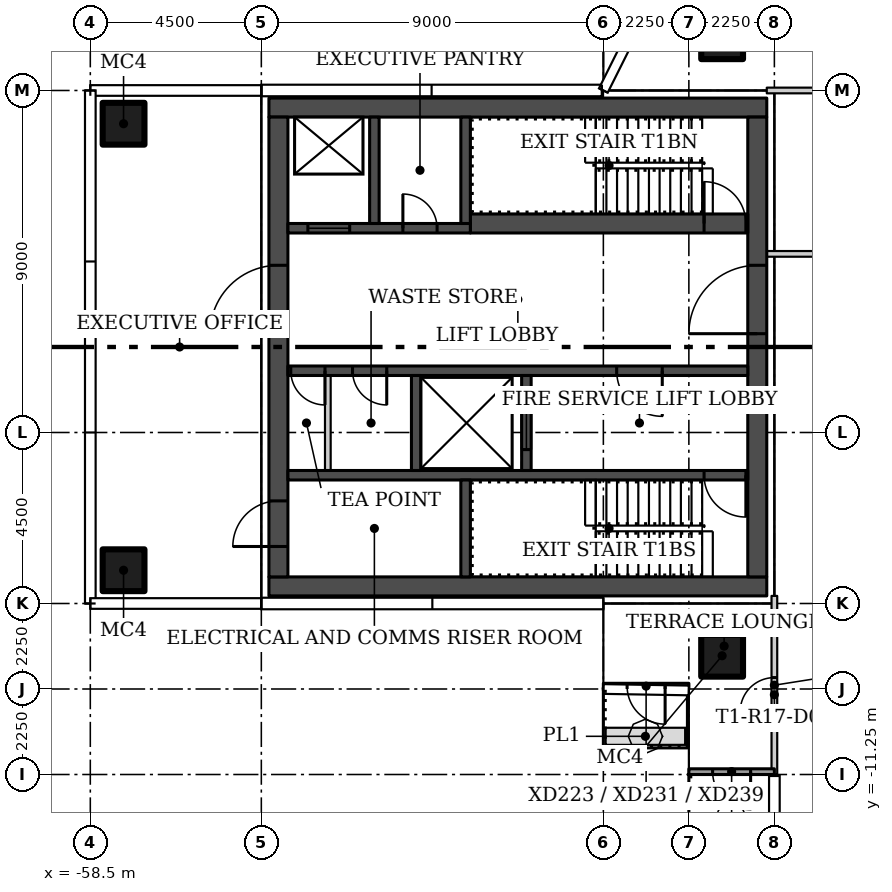
"""IFC4 building model, lengths in metres.
Left out: names, types, materials, properties, quantities, classifications, styles, units other than length and angle.
Written with IfcOpenShell. Run it as: python <this file> out.ifc"""

import sys

from ifc_helpers import new_model, si_unit, direction, frame, frame_2d, origin, origin_2d, place, context, subcontext, project, spatial, rectangle, hollow_rectangle, extrude, element, fill, save


model = new_model("IFC4")
c1 = context("Model", 3, precision=1e-05, world=origin(), true_north=direction((0.0, 1.0)))
c2 = subcontext(c1, "Body", "Model", "MODEL_VIEW")
j1 = project(units=[si_unit("LENGTHUNIT", "METRE"), si_unit("PLANEANGLEUNIT", "RADIAN")], contexts=[c1])
p1 = place(None, origin())
s1 = spatial("IfcSite", under=j1, at=p1, CompositionType="ELEMENT")
p2 = place(p1, origin())
s2 = spatial("IfcBuilding", under=s1, at=p2, CompositionType="ELEMENT")
p3 = place(p2, frame((0.0, 0.0, 150.6)))
s3 = spatial("IfcBuildingStorey", under=s2, at=p3, CompositionType="ELEMENT", Elevation=150.6)
for number, where in (
    (1, (-41.875, 8.125, 0.0)),
    (2, (-41.875, -8.125, 0.0)),
    (3, (-57.625, -5.875, 0.0)),
    (4, (-57.625, 5.875, 0.0)),
):
    element("IfcColumn", number, at=place(p3, frame(where)), inside=s3, PredefinedType="COLUMN", context=c2, shape_type="SweptSolid", body=[
        extrude(hollow_rectangle(XDim=1.1, YDim=1.1, WallThickness=0.04, at=origin_2d()), origin(), (0.0, 0.0, 1.0), 3.55),
    ])
p4 = place(p3, frame((-40.7, 2.45, 0.0)))
e5 = element("IfcWall", 5, at=p4, inside=s3, PredefinedType="PARTITIONING", context=c2, shape_type="SweptSolid", body=[
    extrude(rectangle(XDim=5.525, YDim=0.15, at=frame_2d((2.762, 0.0))), origin(), (0.0, 0.0, 1.0), 3.55),
])
p5 = place(p4, frame((2.375, 0.0, 0.0)))
e6 = element("IfcOpeningElement", 6, at=p5, cuts=e5, PredefinedType="OPENING", context=c2, shape_type="SweptSolid", body=[
    extrude(rectangle(XDim=0.9, YDim=2.1, at=frame_2d((0.45, 1.05))), frame((0.0, 0.085, 0.0), z_axis=(0.0, -1.0, 0.0), x_axis=(1.0, 0.0, 0.0)), (0.0, 0.0, 1.0), 0.17),
])
p6 = place(p3, frame((-40.5, -11.25, 0.0), z_axis=(0.0, 0.0, 1.0), x_axis=(0.0, 1.0, 0.0)))
e7 = element("IfcWall", 7, at=p6, inside=s3, PredefinedType="PARTITIONING", context=c2, shape_type="SweptSolid", body=[
    extrude(rectangle(XDim=4.7, YDim=0.15, at=frame_2d((2.35, 0.0))), origin(), (0.0, 0.0, 1.0), 3.55),
])
p7 = place(p6, frame((1.65, 0.0, 0.0)))
e8 = element("IfcOpeningElement", 8, at=p7, cuts=e7, PredefinedType="OPENING", context=c2, shape_type="SweptSolid", body=[
    extrude(rectangle(XDim=0.9, YDim=2.1, at=frame_2d((0.45, 1.05))), frame((0.0, 0.085, 0.0), z_axis=(0.0, -1.0, 0.0), x_axis=(1.0, 0.0, 0.0)), (0.0, 0.0, 1.0), 0.17),
])
p8 = place(p3, frame((-40.7, 6.75, 0.0)))
e9 = element("IfcWall", 9, at=p8, inside=s3, PredefinedType="PARTITIONING", context=c2, shape_type="SweptSolid", body=[
    extrude(rectangle(XDim=10.775, YDim=0.15, at=frame_2d((5.387, 0.0))), origin(), (0.0, 0.0, 1.0), 3.55),
])
p9 = place(p3, frame((-42.75, -8.925, 0.0), z_axis=(0.0, 0.0, 1.0), x_axis=(-1.0, 0.0, 0.0)))
e10 = element("IfcWall", 10, at=p9, inside=s3, PredefinedType="SOLIDWALL", context=c2, shape_type="SweptSolid", body=[
    extrude(rectangle(XDim=2.25, YDim=0.15, at=frame_2d((1.125, 0.0))), origin(), (0.0, 0.0, 1.0), 3.45),
])
p10 = place(p9, frame((0.625, 0.0, 0.0)))
e11 = element("IfcOpeningElement", 11, at=p10, cuts=e10, PredefinedType="OPENING", context=c2, shape_type="SweptSolid", body=[
    extrude(rectangle(XDim=1.0, YDim=2.4, at=frame_2d((0.5, 1.2))), frame((0.0, 0.085, 0.0), z_axis=(0.0, -1.0, 0.0), x_axis=(1.0, 0.0, 0.0)), (0.0, 0.0, 1.0), 0.17),
])
p11 = place(p3, frame((-40.5, -11.175, 0.0), z_axis=(0.0, 0.0, 1.0), x_axis=(-1.0, 0.0, 0.0)))
e12 = element("IfcWall", 12, at=p11, inside=s3, PredefinedType="SOLIDWALL", context=c2, shape_type="SweptSolid", body=[
    extrude(rectangle(XDim=2.25, YDim=0.15, at=frame_2d((1.125, 0.0))), origin(), (0.0, 0.0, 1.0), 3.45),
])
p12 = place(p11, frame((0.625, 0.0, 0.0)))
e13 = element("IfcOpeningElement", 13, at=p12, cuts=e12, PredefinedType="OPENING", context=c2, shape_type="SweptSolid", body=[
    extrude(rectangle(XDim=1.0, YDim=2.4, at=frame_2d((0.5, 1.2))), frame((0.0, 0.085, 0.0), z_axis=(0.0, -1.0, 0.0), x_axis=(1.0, 0.0, 0.0)), (0.0, 0.0, 1.0), 0.17),
])
for number, where, z_axis, x_axis in (
    (14, (-40.7, -6.3, 0.0), (0.0, 0.0, 1.0), (-1.0, 0.0, 0.0)),
    (15, (-40.7, 6.3, 0.0), (0.0, 0.0, 1.0), (-1.0, 0.0, 0.0)),
):
    element("IfcWall", number, at=place(p3, frame(where, z_axis=z_axis, x_axis=x_axis)), inside=s3, PredefinedType="SHEAR", context=c2, shape_type="SweptSolid", body=[
        extrude(rectangle(XDim=13.1, YDim=0.5, at=frame_2d((6.55, 0.0))), origin(), (0.0, 0.0, 1.0), 3.55),
    ])
p13 = place(p3, frame((-40.95, -6.05, 0.0), z_axis=(0.0, 0.0, 1.0), x_axis=(0.0, 1.0, 0.0)))
e16 = element("IfcWall", 16, at=p13, inside=s3, PredefinedType="SHEAR", context=c2, shape_type="SweptSolid", body=[
    extrude(rectangle(XDim=12.1, YDim=0.5, at=frame_2d((6.05, 0.0))), origin(), (0.0, 0.0, 1.0), 3.55),
])
p14 = place(p13, frame((6.4, 0.0, 0.0)))
e17 = element("IfcOpeningElement", 17, at=p14, cuts=e16, PredefinedType="OPENING", context=c2, shape_type="SweptSolid", body=[
    extrude(rectangle(XDim=1.8, YDim=2.4, at=frame_2d((0.9, 1.2))), frame((0.0, 0.26, 0.0), z_axis=(0.0, -1.0, 0.0), x_axis=(1.0, 0.0, 0.0)), (0.0, 0.0, 1.0), 0.52),
])
p15 = place(p3, frame((-53.55, -6.05, 0.0), z_axis=(0.0, 0.0, 1.0), x_axis=(0.0, 1.0, 0.0)))
e18 = element("IfcWall", 18, at=p15, inside=s3, PredefinedType="SHEAR", context=c2, shape_type="SweptSolid", body=[
    extrude(rectangle(XDim=12.1, YDim=0.5, at=frame_2d((6.05, 0.0))), origin(), (0.0, 0.0, 1.0), 3.55),
])
p16 = place(p15, frame((0.8, 0.0, 0.0)))
e19 = element("IfcOpeningElement", 19, at=p16, cuts=e18, PredefinedType="OPENING", context=c2, shape_type="SweptSolid", body=[
    extrude(rectangle(XDim=1.2, YDim=2.1, at=frame_2d((0.6, 1.05))), frame((0.0, 0.26, 0.0), z_axis=(0.0, -1.0, 0.0), x_axis=(1.0, 0.0, 0.0)), (0.0, 0.0, 1.0), 0.52),
])
p17 = place(p15, frame((6.4, 0.0, 0.0)))
e20 = element("IfcOpeningElement", 20, at=p17, cuts=e18, PredefinedType="OPENING", context=c2, shape_type="SweptSolid", body=[
    extrude(rectangle(XDim=1.8, YDim=2.4, at=frame_2d((0.9, 1.2))), frame((0.0, 0.26, 0.0), z_axis=(0.0, -1.0, 0.0), x_axis=(1.0, 0.0, 0.0)), (0.0, 0.0, 1.0), 0.52),
])
p18 = place(p3, frame((-41.2, -3.375, 0.0), z_axis=(0.0, 0.0, 1.0), x_axis=(-1.0, 0.0, 0.0)))
e21 = element("IfcWall", 21, at=p18, inside=s3, PredefinedType="SHEAR", context=c2, shape_type="SweptSolid", body=[
    extrude(rectangle(XDim=12.1, YDim=0.25, at=frame_2d((6.05, 0.0))), origin(), (0.0, 0.0, 1.0), 3.55),
])
p19 = place(p18, frame((0.05, 0.0, 0.0)))
e22 = element("IfcOpeningElement", 22, at=p19, cuts=e21, PredefinedType="OPENING", context=c2, shape_type="SweptSolid", body=[
    extrude(rectangle(XDim=1.1, YDim=2.1, at=frame_2d((0.55, 1.05))), frame((0.0, 0.135, 0.0), z_axis=(0.0, -1.0, 0.0), x_axis=(1.0, 0.0, 0.0)), (0.0, 0.0, 1.0), 0.27),
])
p20 = place(p3, frame((-48.625, -6.05, 0.0), z_axis=(0.0, 0.0, 1.0), x_axis=(0.0, 1.0, 0.0)))
e23 = element("IfcWall", 23, at=p20, inside=s3, PredefinedType="SHEAR", context=c2, shape_type="SweptSolid", body=[
    extrude(rectangle(XDim=2.55, YDim=0.25, at=frame_2d((1.275, 0.0))), origin(), (0.0, 0.0, 1.0), 3.55),
])
p21 = place(p3, frame((-41.2, -0.625, 0.0), z_axis=(0.0, 0.0, 1.0), x_axis=(-1.0, 0.0, 0.0)))
e24 = element("IfcWall", 24, at=p21, inside=s3, PredefinedType="SHEAR", context=c2, shape_type="SweptSolid", body=[
    extrude(rectangle(XDim=12.1, YDim=0.25, at=frame_2d((6.05, 0.0))), origin(), (0.0, 0.0, 1.0), 3.55),
])
p22 = place(p21, frame((2.25, 0.0, 0.0)))
e25 = element("IfcOpeningElement", 25, at=p22, cuts=e24, PredefinedType="OPENING", context=c2, shape_type="SweptSolid", body=[
    extrude(rectangle(XDim=1.2, YDim=2.1, at=frame_2d((0.6, 1.05))), frame((0.0, 0.135, 0.0), z_axis=(0.0, -1.0, 0.0), x_axis=(1.0, 0.0, 0.0)), (0.0, 0.0, 1.0), 0.27),
])
p23 = place(p21, frame((9.5, 0.0, 0.0)))
e26 = element("IfcOpeningElement", 26, at=p23, cuts=e24, PredefinedType="OPENING", context=c2, shape_type="SweptSolid", body=[
    extrude(rectangle(XDim=0.9, YDim=2.1, at=frame_2d((0.45, 1.05))), frame((0.0, 0.135, 0.0), z_axis=(0.0, -1.0, 0.0), x_axis=(1.0, 0.0, 0.0)), (0.0, 0.0, 1.0), 0.27),
])
p24 = place(p21, frame((11.125, 0.0, 0.0)))
e27 = element("IfcOpeningElement", 27, at=p24, cuts=e24, PredefinedType="OPENING", context=c2, shape_type="SweptSolid", body=[
    extrude(rectangle(XDim=0.9, YDim=2.1, at=frame_2d((0.45, 1.05))), frame((0.0, 0.135, 0.0), z_axis=(0.0, -1.0, 0.0), x_axis=(1.0, 0.0, 0.0)), (0.0, 0.0, 1.0), 0.27),
])
p25 = place(p3, frame((-47.025, -3.25, 0.0), z_axis=(0.0, 0.0, 1.0), x_axis=(0.0, 1.0, 0.0)))
e28 = element("IfcWall", 28, at=p25, inside=s3, PredefinedType="SHEAR", context=c2, shape_type="SweptSolid", body=[
    extrude(rectangle(XDim=2.5, YDim=0.25, at=frame_2d((1.25, 0.0))), origin(), (0.0, 0.0, 1.0), 3.55),
])
p26 = place(p25, frame((0.55, 0.0, 0.0)))
e29 = element("IfcOpeningElement", 29, at=p26, cuts=e28, PredefinedType="OPENING", context=c2, shape_type="SweptSolid", body=[
    extrude(rectangle(XDim=1.4, YDim=2.4, at=frame_2d((0.7, 1.2))), frame((0.0, 0.135, 0.0), z_axis=(0.0, -1.0, 0.0), x_axis=(1.0, 0.0, 0.0)), (0.0, 0.0, 1.0), 0.27),
])
p27 = place(p3, frame((-49.925, -3.25, 0.0), z_axis=(0.0, 0.0, 1.0), x_axis=(0.0, 1.0, 0.0)))
e30 = element("IfcWall", 30, at=p27, inside=s3, PredefinedType="SHEAR", context=c2, shape_type="SweptSolid", body=[
    extrude(rectangle(XDim=2.5, YDim=0.25, at=frame_2d((1.25, 0.0))), origin(), (0.0, 0.0, 1.0), 3.55),
])
p28 = place(p3, frame((-52.25, -3.25, 0.0), z_axis=(0.0, 0.0, 1.0), x_axis=(0.0, 1.0, 0.0)))
e31 = element("IfcWall", 31, at=p28, inside=s3, PredefinedType="PARTITIONING", context=c2, shape_type="SweptSolid", body=[
    extrude(rectangle(XDim=2.5, YDim=0.15, at=frame_2d((1.25, 0.0))), origin(), (0.0, 0.0, 1.0), 3.55),
])
p29 = place(p3, frame((-48.5, 3.25, 0.0)))
e32 = element("IfcWall", 32, at=p29, inside=s3, PredefinedType="SHEAR", context=c2, shape_type="SweptSolid", body=[
    extrude(rectangle(XDim=7.3, YDim=0.5, at=frame_2d((3.65, 0.0))), origin(), (0.0, 0.0, 1.0), 3.55),
])
p30 = place(p29, frame((6.15, 0.0, 0.0)))
e33 = element("IfcOpeningElement", 33, at=p30, cuts=e32, PredefinedType="OPENING", context=c2, shape_type="SweptSolid", body=[
    extrude(rectangle(XDim=1.1, YDim=2.1, at=frame_2d((0.55, 1.05))), frame((0.0, 0.26, 0.0), z_axis=(0.0, -1.0, 0.0), x_axis=(1.0, 0.0, 0.0)), (0.0, 0.0, 1.0), 0.52),
])
p31 = place(p3, frame((-53.3, 3.125, 0.0)))
e34 = element("IfcWall", 34, at=p31, inside=s3, PredefinedType="SHEAR", context=c2, shape_type="SweptSolid", body=[
    extrude(rectangle(XDim=4.8, YDim=0.25, at=frame_2d((2.4, 0.0))), origin(), (0.0, 0.0, 1.0), 3.55),
])
p32 = place(p31, frame((0.525, 0.0, 0.0)))
e35 = element("IfcOpeningElement", 35, at=p32, cuts=e34, PredefinedType="OPENING", context=c2, shape_type="SweptSolid", body=[
    extrude(rectangle(XDim=1.1, YDim=2.1, at=frame_2d((0.55, 1.05))), frame((0.0, 0.135, 0.0), z_axis=(0.0, -1.0, 0.0), x_axis=(1.0, 0.0, 0.0)), (0.0, 0.0, 1.0), 0.27),
])
p33 = place(p31, frame((3.025, 0.0, 0.0)))
e36 = element("IfcOpeningElement", 36, at=p33, cuts=e34, PredefinedType="OPENING", context=c2, shape_type="SweptSolid", body=[
    extrude(rectangle(XDim=0.9, YDim=2.1, at=frame_2d((0.45, 1.05))), frame((0.0, 0.135, 0.0), z_axis=(0.0, -1.0, 0.0), x_axis=(1.0, 0.0, 0.0)), (0.0, 0.0, 1.0), 0.27),
])
for number, where, z_axis, x_axis in (
    (37, (-48.625, 3.25, 0.0), (0.0, 0.0, 1.0), (0.0, 1.0, 0.0)),
    (38, (-51.025, 3.25, 0.0), (0.0, 0.0, 1.0), (0.0, 1.0, 0.0)),
):
    element("IfcWall", number, at=place(p3, frame(where, z_axis=z_axis, x_axis=x_axis)), inside=s3, PredefinedType="SHEAR", context=c2, shape_type="SweptSolid", body=[
        extrude(rectangle(XDim=2.8, YDim=0.25, at=frame_2d((1.4, 0.0))), origin(), (0.0, 0.0, 1.0), 3.55),
    ])
p34 = place(p7, origin())
e39 = element("IfcDoor", 39, at=p34, inside=s3, OperationType="SINGLE_SWING_LEFT", PredefinedType="DOOR", context=c2, shape_type="SweptSolid", body=[
    extrude(rectangle(XDim=0.9, YDim=2.1, at=frame_2d((0.45, 1.05))), frame((0.0, 0.025, 0.0), z_axis=(0.0, -1.0, 0.0), x_axis=(1.0, 0.0, 0.0)), (0.0, 0.0, 1.0), 0.05),
])
fill(e8, e39)
p35 = place(p10, origin())
e40 = element("IfcDoor", 40, at=p35, inside=s3, OperationType="SINGLE_SWING_LEFT", PredefinedType="DOOR", context=c2, shape_type="SweptSolid", body=[
    extrude(rectangle(XDim=1.0, YDim=2.4, at=frame_2d((0.5, 1.2))), frame((0.0, 0.025, 0.0), z_axis=(0.0, -1.0, 0.0), x_axis=(1.0, 0.0, 0.0)), (0.0, 0.0, 1.0), 0.05),
])
fill(e11, e40)
p36 = place(p12, origin())
e41 = element("IfcDoor", 41, at=p36, inside=s3, OperationType="SINGLE_SWING_RIGHT", PredefinedType="DOOR", context=c2, shape_type="SweptSolid", body=[
    extrude(rectangle(XDim=1.0, YDim=2.4, at=frame_2d((0.5, 1.2))), frame((0.0, 0.025, 0.0), z_axis=(0.0, -1.0, 0.0), x_axis=(1.0, 0.0, 0.0)), (0.0, 0.0, 1.0), 0.05),
])
fill(e13, e41)
p37 = place(p14, origin())
e42 = element("IfcDoor", 42, at=p37, inside=s3, OperationType="DOUBLE_DOOR_SINGLE_SWING", PredefinedType="DOOR", context=c2, shape_type="SweptSolid", body=[
    extrude(rectangle(XDim=1.8, YDim=2.4, at=frame_2d((0.9, 1.2))), frame((0.0, 0.025, 0.0), z_axis=(0.0, -1.0, 0.0), x_axis=(1.0, 0.0, 0.0)), (0.0, 0.0, 1.0), 0.05),
])
fill(e17, e42)
p38 = place(p16, origin())
e43 = element("IfcDoor", 43, at=p38, inside=s3, OperationType="SINGLE_SWING_LEFT", PredefinedType="DOOR", context=c2, shape_type="SweptSolid", body=[
    extrude(rectangle(XDim=1.2, YDim=2.1, at=frame_2d((0.6, 1.05))), frame((0.0, 0.025, 0.0), z_axis=(0.0, -1.0, 0.0), x_axis=(1.0, 0.0, 0.0)), (0.0, 0.0, 1.0), 0.05),
])
fill(e19, e43)
p39 = place(p17, origin())
e44 = element("IfcDoor", 44, at=p39, inside=s3, OperationType="DOUBLE_DOOR_SINGLE_SWING", PredefinedType="DOOR", context=c2, shape_type="SweptSolid", body=[
    extrude(rectangle(XDim=1.8, YDim=2.4, at=frame_2d((0.9, 1.2))), frame((0.0, 0.025, 0.0), z_axis=(0.0, -1.0, 0.0), x_axis=(1.0, 0.0, 0.0)), (0.0, 0.0, 1.0), 0.05),
])
fill(e20, e44)
p40 = place(p19, origin())
e45 = element("IfcDoor", 45, at=p40, inside=s3, OperationType="SINGLE_SWING_LEFT", PredefinedType="DOOR", context=c2, shape_type="SweptSolid", body=[
    extrude(rectangle(XDim=1.1, YDim=2.1, at=frame_2d((0.55, 1.05))), frame((0.0, 0.025, 0.0), z_axis=(0.0, -1.0, 0.0), x_axis=(1.0, 0.0, 0.0)), (0.0, 0.0, 1.0), 0.05),
])
fill(e22, e45)
p41 = place(p22, origin())
e46 = element("IfcDoor", 46, at=p41, inside=s3, OperationType="SINGLE_SWING_LEFT", PredefinedType="DOOR", context=c2, shape_type="SweptSolid", body=[
    extrude(rectangle(XDim=1.2, YDim=2.1, at=frame_2d((0.6, 1.05))), frame((0.0, 0.025, 0.0), z_axis=(0.0, -1.0, 0.0), x_axis=(1.0, 0.0, 0.0)), (0.0, 0.0, 1.0), 0.05),
])
fill(e25, e46)
p42 = place(p23, origin())
e47 = element("IfcDoor", 47, at=p42, inside=s3, OperationType="SINGLE_SWING_RIGHT", PredefinedType="DOOR", context=c2, shape_type="SweptSolid", body=[
    extrude(rectangle(XDim=0.9, YDim=2.1, at=frame_2d((0.45, 1.05))), frame((0.0, 0.025, 0.0), z_axis=(0.0, -1.0, 0.0), x_axis=(1.0, 0.0, 0.0)), (0.0, 0.0, 1.0), 0.05),
])
fill(e26, e47)
p43 = place(p24, origin())
e48 = element("IfcDoor", 48, at=p43, inside=s3, OperationType="SINGLE_SWING_RIGHT", PredefinedType="DOOR", context=c2, shape_type="SweptSolid", body=[
    extrude(rectangle(XDim=0.9, YDim=2.1, at=frame_2d((0.45, 1.05))), frame((0.0, 0.025, 0.0), z_axis=(0.0, -1.0, 0.0), x_axis=(1.0, 0.0, 0.0)), (0.0, 0.0, 1.0), 0.05),
])
fill(e27, e48)
p44 = place(p26, origin())
e49 = element("IfcDoor", 49, at=p44, inside=s3, OperationType="SLIDING_TO_LEFT", PredefinedType="DOOR", context=c2, shape_type="SweptSolid", body=[
    extrude(rectangle(XDim=1.4, YDim=2.4, at=frame_2d((0.7, 1.2))), frame((0.0, 0.025, 0.0), z_axis=(0.0, -1.0, 0.0), x_axis=(1.0, 0.0, 0.0)), (0.0, 0.0, 1.0), 0.05),
])
fill(e29, e49)
p45 = place(p30, origin())
e50 = element("IfcDoor", 50, at=p45, inside=s3, OperationType="SINGLE_SWING_RIGHT", PredefinedType="DOOR", context=c2, shape_type="SweptSolid", body=[
    extrude(rectangle(XDim=1.1, YDim=2.1, at=frame_2d((0.55, 1.05))), frame((0.0, 0.025, 0.0), z_axis=(0.0, -1.0, 0.0), x_axis=(1.0, 0.0, 0.0)), (0.0, 0.0, 1.0), 0.05),
])
fill(e33, e50)
p46 = place(p32, origin())
e51 = element("IfcDoor", 51, at=p46, inside=s3, OperationType="SLIDING_TO_LEFT", PredefinedType="DOOR", context=c2, shape_type="SweptSolid", body=[
    extrude(rectangle(XDim=1.1, YDim=2.1, at=frame_2d((0.55, 1.05))), frame((0.0, 0.025, 0.0), z_axis=(0.0, -1.0, 0.0), x_axis=(1.0, 0.0, 0.0)), (0.0, 0.0, 1.0), 0.05),
])
fill(e35, e51)
p47 = place(p33, origin())
e52 = element("IfcDoor", 52, at=p47, inside=s3, OperationType="SINGLE_SWING_RIGHT", PredefinedType="DOOR", context=c2, shape_type="SweptSolid", body=[
    extrude(rectangle(XDim=0.9, YDim=2.1, at=frame_2d((0.45, 1.05))), frame((0.0, 0.025, 0.0), z_axis=(0.0, -1.0, 0.0), x_axis=(1.0, 0.0, 0.0)), (0.0, 0.0, 1.0), 0.05),
])
fill(e36, e52)
save(model, sys.argv[1])
